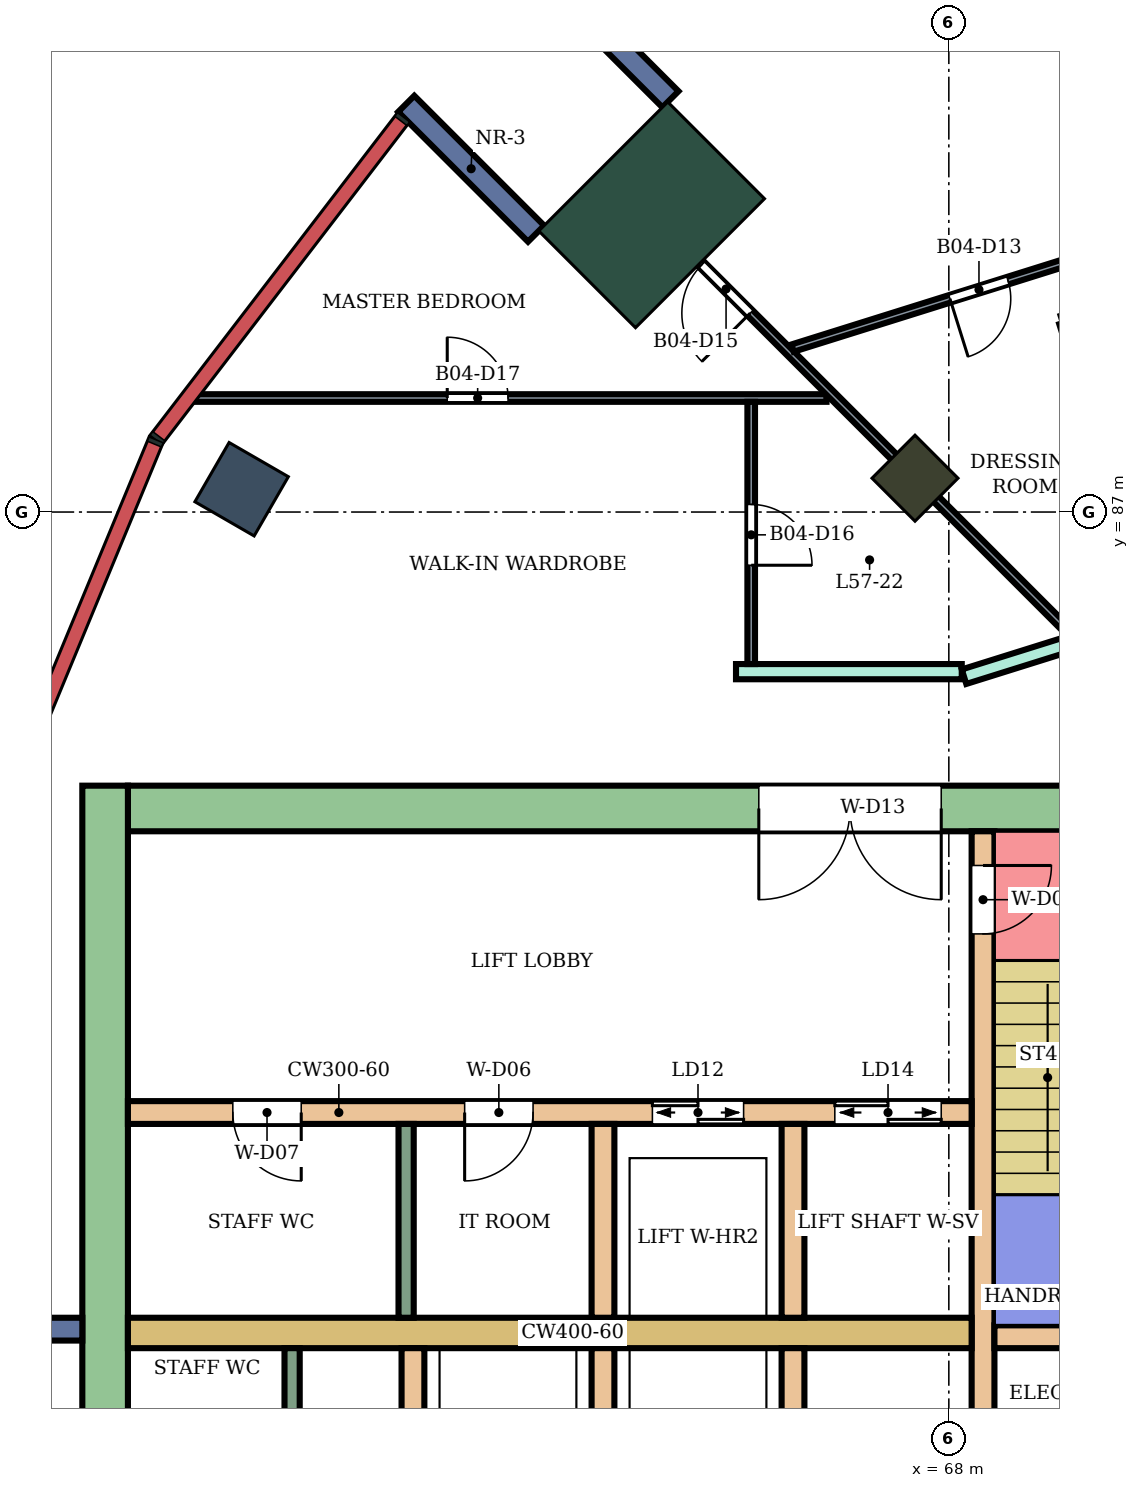
"""IFC4 building model, lengths in metres.
Left out: names, types, materials, properties, quantities, classifications, styles, units other than length and angle.
Written with IfcOpenShell. Run it as: python <this file> out.ifc"""

import sys

from ifc_helpers import new_model, si_unit, direction, frame, frame_2d, origin, origin_2d, place, context, subcontext, project, spatial, rectangle, extrude, element, fill, save


model = new_model("IFC4")
c1 = context("Model", 3, precision=1e-05, world=origin(), true_north=direction((0.0, 1.0)))
c2 = subcontext(c1, "Body", "Model", "MODEL_VIEW")
j1 = project(units=[si_unit("LENGTHUNIT", "METRE"), si_unit("PLANEANGLEUNIT", "RADIAN")], contexts=[c1])
p1 = place(None, origin())
s1 = spatial("IfcSite", under=j1, at=p1, CompositionType="ELEMENT")
p2 = place(p1, origin())
s2 = spatial("IfcBuilding", under=s1, at=p2, CompositionType="ELEMENT")
p3 = place(p2, frame((0.0, 0.0, 249.9)))
s3 = spatial("IfcBuildingStorey", under=s2, at=p3, CompositionType="ELEMENT", Elevation=249.9)
p4 = place(p3, frame((58.696, 87.3, 0.0), z_axis=(0.0, 0.0, 1.0), x_axis=(-0.866025403784, 0.5, 0.0)))
e1 = element("IfcColumn", 1, at=p4, inside=s3, PredefinedType="COLUMN", context=c2, shape_type="SweptSolid", body=[
    extrude(rectangle(XDim=0.9, YDim=0.9, at=origin_2d()), origin(), (0.0, 0.0, 1.0), 4.2),
])
p5 = place(p3, frame((67.555, 87.445, 0.0), z_axis=(0.0, 0.0, 1.0), x_axis=(-0.707106781187, 0.707106781187, 0.0)))
e2 = element("IfcColumn", 2, at=p5, inside=s3, PredefinedType="COLUMN", context=c2, shape_type="SweptSolid", body=[
    extrude(rectangle(XDim=0.8, YDim=0.8, at=origin_2d()), origin(), (0.0, 0.0, 1.0), 4.2),
])
p6 = place(p3, frame((64.09, 90.91, 0.0), z_axis=(0.0, 0.0, 1.0), x_axis=(-0.707106781187, 0.707106781187, 0.0)))
e3 = element("IfcColumn", 3, at=p6, inside=s3, PredefinedType="COLUMN", context=c2, shape_type="SweptSolid", body=[
    extrude(rectangle(XDim=1.8, YDim=2.4, at=origin_2d()), origin(), (0.0, 0.0, 1.0), 4.2),
])
p7 = place(p3, frame((72.1, 83.1, 0.0), z_axis=(0.0, 0.0, 1.0), x_axis=(-1.0, 0.0, 0.0)))
e4 = element("IfcWall", 4, at=p7, inside=s3, PredefinedType="SHEAR", context=c2, shape_type="SweptSolid", body=[
    extrude(rectangle(XDim=14.9, YDim=0.6, at=frame_2d((7.45, 0.0))), origin(), (0.0, 0.0, 1.0), 3.88),
])
p8 = place(p7, frame((4.2, 0.0, 0.0)))
e5 = element("IfcOpeningElement", 5, at=p8, cuts=e4, PredefinedType="OPENING", context=c2, shape_type="SweptSolid", body=[
    extrude(rectangle(XDim=2.4, YDim=2.4, at=frame_2d((1.2, 1.2))), frame((0.0, 0.31, 0.0), z_axis=(0.0, -1.0, 0.0), x_axis=(1.0, 0.0, 0.0)), (0.0, 0.0, 1.0), 0.62),
])
p9 = place(p3, frame((56.9, 83.4, 0.0), z_axis=(0.0, 0.0, 1.0), x_axis=(0.0, -1.0, 0.0)))
e6 = element("IfcWall", 6, at=p9, inside=s3, PredefinedType="SHEAR", context=c2, shape_type="SweptSolid", body=[
    extrude(rectangle(XDim=16.8, YDim=0.6, at=frame_2d((8.4, 0.0))), origin(), (0.0, 0.0, 1.0), 3.88),
])
p10 = place(p3, frame((68.45, 82.8, 0.0), z_axis=(0.0, 0.0, 1.0), x_axis=(0.0, -1.0, 0.0)))
e7 = element("IfcWall", 7, at=p10, inside=s3, PredefinedType="SHEAR", context=c2, shape_type="SweptSolid", body=[
    extrude(rectangle(XDim=7.8, YDim=0.3, at=frame_2d((3.9, 0.0))), origin(), (0.0, 0.0, 1.0), 3.88),
])
p11 = place(p10, frame((0.45, 0.0, 0.0)))
e8 = element("IfcOpeningElement", 8, at=p11, cuts=e7, PredefinedType="OPENING", context=c2, shape_type="SweptSolid", body=[
    extrude(rectangle(XDim=0.9, YDim=2.1, at=frame_2d((0.45, 1.05))), frame((0.0, 0.16, 0.0), z_axis=(0.0, -1.0, 0.0), x_axis=(1.0, 0.0, 0.0)), (0.0, 0.0, 1.0), 0.32),
])
p12 = place(p3, frame((71.65, 76.15, 0.0), z_axis=(0.0, 0.0, 1.0), x_axis=(-1.0, 0.0, 0.0)))
e9 = element("IfcWall", 9, at=p12, inside=s3, PredefinedType="SHEAR", context=c2, shape_type="SweptSolid", body=[
    extrude(rectangle(XDim=3.05, YDim=0.3, at=frame_2d((1.525, 0.0))), origin(), (0.0, 0.0, 1.0), 3.88),
])
p13 = place(p3, frame((68.3, 76.2, 0.0), z_axis=(0.0, 0.0, 1.0), x_axis=(-1.0, 0.0, 0.0)))
e10 = element("IfcWall", 10, at=p13, inside=s3, PredefinedType="SHEAR", context=c2, shape_type="SweptSolid", body=[
    extrude(rectangle(XDim=11.1, YDim=0.4, at=frame_2d((5.55, 0.0))), origin(), (0.0, 0.0, 1.0), 3.88),
])
p14 = place(p3, frame((68.3, 79.1, 0.0), z_axis=(0.0, 0.0, 1.0), x_axis=(-1.0, 0.0, 0.0)))
e11 = element("IfcWall", 11, at=p14, inside=s3, PredefinedType="SHEAR", context=c2, shape_type="SweptSolid", body=[
    extrude(rectangle(XDim=11.1, YDim=0.3, at=frame_2d((5.55, 0.0))), origin(), (0.0, 0.0, 1.0), 3.88),
])
p15 = place(p14, frame((0.4, 0.0, 0.0)))
e12 = element("IfcOpeningElement", 12, at=p15, cuts=e11, PredefinedType="OPENING", context=c2, shape_type="SweptSolid", body=[
    extrude(rectangle(XDim=1.4, YDim=2.1, at=frame_2d((0.7, 1.05))), frame((0.0, 0.16, 0.0), z_axis=(0.0, -1.0, 0.0), x_axis=(1.0, 0.0, 0.0)), (0.0, 0.0, 1.0), 0.32),
])
p16 = place(p14, frame((3.0, 0.0, 0.0)))
e13 = element("IfcOpeningElement", 13, at=p16, cuts=e11, PredefinedType="OPENING", context=c2, shape_type="SweptSolid", body=[
    extrude(rectangle(XDim=1.2, YDim=2.1, at=frame_2d((0.6, 1.05))), frame((0.0, 0.16, 0.0), z_axis=(0.0, -1.0, 0.0), x_axis=(1.0, 0.0, 0.0)), (0.0, 0.0, 1.0), 0.32),
])
p17 = place(p14, frame((5.77, 0.0, 0.0)))
e14 = element("IfcOpeningElement", 14, at=p17, cuts=e11, PredefinedType="OPENING", context=c2, shape_type="SweptSolid", body=[
    extrude(rectangle(XDim=0.9, YDim=2.1, at=frame_2d((0.45, 1.05))), frame((0.0, 0.16, 0.0), z_axis=(0.0, -1.0, 0.0), x_axis=(1.0, 0.0, 0.0)), (0.0, 0.0, 1.0), 0.32),
])
p18 = place(p14, frame((8.82, 0.0, 0.0)))
e15 = element("IfcOpeningElement", 15, at=p18, cuts=e11, PredefinedType="OPENING", context=c2, shape_type="SweptSolid", body=[
    extrude(rectangle(XDim=0.9, YDim=2.1, at=frame_2d((0.45, 1.05))), frame((0.0, 0.16, 0.0), z_axis=(0.0, -1.0, 0.0), x_axis=(1.0, 0.0, 0.0)), (0.0, 0.0, 1.0), 0.32),
])
for number, where, z_axis, x_axis in (
    (16, (65.95, 76.0, 0.0), (0.0, 0.0, 1.0), (0.0, -1.0, 0.0)),
    (17, (63.45, 76.0, 0.0), (0.0, 0.0, 1.0), (0.0, -1.0, 0.0)),
    (18, (60.95, 76.0, 0.0), (0.0, 0.0, 1.0), (0.0, -1.0, 0.0)),
    (19, (65.95, 78.95, 0.0), (0.0, 0.0, 1.0), (0.0, -1.0, 0.0)),
    (20, (63.45, 78.95, 0.0), (0.0, 0.0, 1.0), (0.0, -1.0, 0.0)),
):
    element("IfcWall", number, at=place(p3, frame(where, z_axis=z_axis, x_axis=x_axis)), inside=s3, PredefinedType="SHEAR", context=c2, shape_type="SweptSolid", body=[
        extrude(rectangle(XDim=2.55, YDim=0.3, at=frame_2d((1.275, 0.0))), origin(), (0.0, 0.0, 1.0), 3.88),
    ])
for number, where, z_axis, x_axis in (
    (21, (64.338, 92.43, 0.0), (0.0, 0.0, 1.0), (-0.707, 0.707, 0.0)),
    (22, (62.57, 90.662, 0.0), (0.0, 0.0, 1.0), (-0.707, 0.707, 0.0)),
    (23, (56.6, 76.25, 0.0), (0.0, 0.0, 1.0), (-1.0, 0.0, 0.0)),
):
    element("IfcWall", number, at=place(p3, frame(where, z_axis=z_axis, x_axis=x_axis)), inside=s3, PredefinedType="NOTDEFINED", context=c2, shape_type="SweptSolid", body=[
        extrude(rectangle(XDim=2.416, YDim=0.3, at=frame_2d((1.208, 0.0))), origin(), (0.0, 0.0, 1.0), 4.2),
    ])
p19 = place(p3, frame((65.2, 84.9, 0.0), z_axis=(0.0, 0.0, 1.0), x_axis=(1.0, 0.0, 0.0)))
e24 = element("IfcWall", 24, at=p19, inside=s3, PredefinedType="PARTITIONING", context=c2, shape_type="SweptSolid", body=[
    extrude(rectangle(XDim=2.97, YDim=0.2, at=frame_2d((1.485, 0.0))), origin(), (0.0, 0.0, 1.0), 3.75),
])
p20 = place(p3, frame((68.2, 84.834, 0.0), z_axis=(0.0, 0.0, 1.0), x_axis=(0.954260265251, 0.298977166624, 0.0)))
e25 = element("IfcWall", 25, at=p20, inside=s3, PredefinedType="PARTITIONING", context=c2, shape_type="SweptSolid", body=[
    extrude(rectangle(XDim=5.741, YDim=0.2, at=frame_2d((2.87, 0.0))), origin(), (0.0, 0.0, 1.0), 3.75),
])
p21 = place(p3, frame((58.072, 88.5, 0.0), z_axis=(0.0, 0.0, 1.0), x_axis=(1.0, 0.0, 0.0)))
e26 = element("IfcWall", 26, at=p21, inside=s3, PredefinedType="PARTITIONING", context=c2, shape_type="SweptSolid", body=[
    extrude(rectangle(XDim=8.319, YDim=0.1, at=frame_2d((4.159, 0.0))), origin(), (0.0, 0.0, 1.0), 3.75),
])
p22 = place(p21, frame((3.329, 0.0, 0.0)))
e27 = element("IfcOpeningElement", 27, at=p22, cuts=e26, PredefinedType="OPENING", context=c2, shape_type="SweptSolid", body=[
    extrude(rectangle(XDim=0.8, YDim=2.1, at=frame_2d((0.4, 1.05))), frame((0.0, 0.06, 0.0), z_axis=(0.0, -1.0, 0.0), x_axis=(1.0, 0.0, 0.0)), (0.0, 0.0, 1.0), 0.12),
])
p23 = place(p3, frame((63.597, 91.407, 0.0), z_axis=(0.0, 0.0, 1.0), x_axis=(0.70700623685, -0.707207311228, 0.0)))
e28 = element("IfcWall", 28, at=p23, inside=s3, PredefinedType="PARTITIONING", context=c2, shape_type="SweptSolid", body=[
    extrude(rectangle(XDim=8.499, YDim=0.1, at=frame_2d((4.25, 0.0))), origin(), (0.0, 0.0, 1.0), 3.75),
])
p24 = place(p23, frame((1.632, 0.0, 0.0)))
e29 = element("IfcOpeningElement", 29, at=p24, cuts=e28, PredefinedType="OPENING", context=c2, shape_type="SweptSolid", body=[
    extrude(rectangle(XDim=0.9, YDim=2.1, at=frame_2d((0.45, 1.05))), frame((0.0, 0.06, 0.0), z_axis=(0.0, -1.0, 0.0), x_axis=(1.0, 0.0, 0.0)), (0.0, 0.0, 1.0), 0.12),
])
p25 = place(p3, frame((65.4, 85.0, 0.0), z_axis=(0.0, 0.0, 1.0), x_axis=(0.0, 1.0, 0.0)))
e30 = element("IfcWall", 30, at=p25, inside=s3, PredefinedType="PARTITIONING", context=c2, shape_type="SweptSolid", body=[
    extrude(rectangle(XDim=3.45, YDim=0.1, at=frame_2d((1.725, 0.0))), origin(), (0.0, 0.0, 1.0), 3.75),
])
p26 = place(p25, frame((1.3, 0.0, 0.0)))
e31 = element("IfcOpeningElement", 31, at=p26, cuts=e30, PredefinedType="OPENING", context=c2, shape_type="SweptSolid", body=[
    extrude(rectangle(XDim=0.8, YDim=2.1, at=frame_2d((0.4, 1.05))), frame((0.0, 0.06, 0.0), z_axis=(0.0, -1.0, 0.0), x_axis=(1.0, 0.0, 0.0)), (0.0, 0.0, 1.0), 0.12),
])
p27 = place(p3, frame((65.944, 89.157, 0.0), z_axis=(0.0, 0.0, 1.0), x_axis=(0.954238484697, 0.299046675828, 0.0)))
e32 = element("IfcWall", 32, at=p27, inside=s3, PredefinedType="PARTITIONING", context=c2, shape_type="SweptSolid", body=[
    extrude(rectangle(XDim=5.169, YDim=0.1, at=frame_2d((2.585, 0.0))), origin(), (0.0, 0.0, 1.0), 3.75),
])
p28 = place(p27, frame((2.17, 0.0, 0.0)))
e33 = element("IfcOpeningElement", 33, at=p28, cuts=e32, PredefinedType="OPENING", context=c2, shape_type="SweptSolid", body=[
    extrude(rectangle(XDim=0.8, YDim=2.1, at=frame_2d((0.4, 1.05))), frame((0.0, 0.06, 0.0), z_axis=(0.0, -1.0, 0.0), x_axis=(1.0, 0.0, 0.0)), (0.0, 0.0, 1.0), 0.12),
])
p29 = place(p3, frame((67.111, 97.347, 0.0), z_axis=(0.0, 0.0, 1.0), x_axis=(0.499428303955, -0.866355221147, 0.0)))
e34 = element("IfcWall", 34, at=p29, inside=s3, PredefinedType="PARTITIONING", context=c2, shape_type="SweptSolid", body=[
    extrude(rectangle(XDim=12.456, YDim=0.1, at=frame_2d((6.228, 0.0))), origin(), (0.0, 0.0, 1.0), 3.75),
])
p30 = place(p29, frame((2.538, 0.0, 0.0)))
e35 = element("IfcOpeningElement", 35, at=p30, cuts=e34, PredefinedType="OPENING", context=c2, shape_type="SweptSolid", body=[
    extrude(rectangle(XDim=0.9, YDim=2.1, at=frame_2d((0.45, 1.05))), frame((0.0, 0.06, 0.0), z_axis=(0.0, -1.0, 0.0), x_axis=(1.0, 0.0, 0.0)), (0.0, 0.0, 1.0), 0.12),
])
p31 = place(p29, frame((10.055, 0.0, 0.0)))
e36 = element("IfcOpeningElement", 36, at=p31, cuts=e34, PredefinedType="OPENING", context=c2, shape_type="SweptSolid", body=[
    extrude(rectangle(XDim=0.8, YDim=2.1, at=frame_2d((0.4, 1.05))), frame((0.0, 0.06, 0.0), z_axis=(0.0, -1.0, 0.0), x_axis=(1.0, 0.0, 0.0)), (0.0, 0.0, 1.0), 0.12),
])
for number, where, z_axis, x_axis in (
    (37, (59.36, 76.0, 0.0), (0.0, 0.0, 1.0), (0.0, -1.0, 0.0)),
    (38, (60.86, 78.95, 0.0), (0.0, 0.0, 1.0), (0.0, -1.0, 0.0)),
):
    element("IfcWall", number, at=place(p3, frame(where, z_axis=z_axis, x_axis=x_axis)), inside=s3, PredefinedType="PARTITIONING", context=c2, shape_type="SweptSolid", body=[
        extrude(rectangle(XDim=2.55, YDim=0.2, at=frame_2d((1.275, 0.0))), origin(), (0.0, 0.0, 1.0), 3.88),
    ])
p32 = place(p28, frame((0.8, 0.0, 0.0), z_axis=(0.0, 0.0, 1.0), x_axis=(-1.0, 0.0, 0.0)))
e39 = element("IfcDoor", 39, at=p32, inside=s3, OperationType="SINGLE_SWING_RIGHT", PredefinedType="DOOR", context=c2, shape_type="SweptSolid", body=[
    extrude(rectangle(XDim=0.8, YDim=2.1, at=frame_2d((0.4, 1.05))), frame((0.0, 0.025, 0.0), z_axis=(0.0, -1.0, 0.0), x_axis=(1.0, 0.0, 0.0)), (0.0, 0.0, 1.0), 0.05),
])
fill(e33, e39)
p33 = place(p24, frame((0.9, 0.0, 0.0), z_axis=(0.0, 0.0, 1.0), x_axis=(-1.0, 0.0, 0.0)))
e40 = element("IfcDoor", 40, at=p33, inside=s3, OperationType="SINGLE_SWING_LEFT", PredefinedType="DOOR", context=c2, shape_type="SweptSolid", body=[
    extrude(rectangle(XDim=0.9, YDim=2.1, at=frame_2d((0.45, 1.05))), frame((0.0, 0.025, 0.0), z_axis=(0.0, -1.0, 0.0), x_axis=(1.0, 0.0, 0.0)), (0.0, 0.0, 1.0), 0.05),
])
fill(e29, e40)
p34 = place(p26, frame((0.8, 0.0, 0.0), z_axis=(0.0, 0.0, 1.0), x_axis=(-1.0, 0.0, 0.0)))
e41 = element("IfcDoor", 41, at=p34, inside=s3, OperationType="SINGLE_SWING_RIGHT", PredefinedType="DOOR", context=c2, shape_type="SweptSolid", body=[
    extrude(rectangle(XDim=0.8, YDim=2.1, at=frame_2d((0.4, 1.05))), frame((0.0, 0.025, 0.0), z_axis=(0.0, -1.0, 0.0), x_axis=(1.0, 0.0, 0.0)), (0.0, 0.0, 1.0), 0.05),
])
fill(e31, e41)
p35 = place(p22, origin())
e42 = element("IfcDoor", 42, at=p35, inside=s3, OperationType="SINGLE_SWING_LEFT", PredefinedType="DOOR", context=c2, shape_type="SweptSolid", body=[
    extrude(rectangle(XDim=0.8, YDim=2.1, at=frame_2d((0.4, 1.05))), frame((0.0, 0.025, 0.0), z_axis=(0.0, -1.0, 0.0), x_axis=(1.0, 0.0, 0.0)), (0.0, 0.0, 1.0), 0.05),
])
fill(e27, e42)
p36 = place(p11, origin())
e43 = element("IfcDoor", 43, at=p36, inside=s3, OperationType="SINGLE_SWING_LEFT", PredefinedType="DOOR", context=c2, shape_type="SweptSolid", body=[
    extrude(rectangle(XDim=0.9, YDim=2.1, at=frame_2d((0.45, 1.05))), frame((0.0, 0.025, 0.0), z_axis=(0.0, -1.0, 0.0), x_axis=(1.0, 0.0, 0.0)), (0.0, 0.0, 1.0), 0.05),
])
fill(e8, e43)
p37 = place(p15, origin())
e44 = element("IfcDoor", 44, at=p37, inside=s3, OperationType="DOUBLE_DOOR_SLIDING", PredefinedType="DOOR", context=c2, shape_type="SweptSolid", body=[
    extrude(rectangle(XDim=1.4, YDim=2.1, at=frame_2d((0.7, 1.05))), frame((0.0, 0.025, 0.0), z_axis=(0.0, -1.0, 0.0), x_axis=(1.0, 0.0, 0.0)), (0.0, 0.0, 1.0), 0.05),
])
fill(e12, e44)
p38 = place(p16, origin())
e45 = element("IfcDoor", 45, at=p38, inside=s3, OperationType="DOUBLE_DOOR_SLIDING", PredefinedType="DOOR", context=c2, shape_type="SweptSolid", body=[
    extrude(rectangle(XDim=1.2, YDim=2.1, at=frame_2d((0.6, 1.05))), frame((0.0, 0.025, 0.0), z_axis=(0.0, -1.0, 0.0), x_axis=(1.0, 0.0, 0.0)), (0.0, 0.0, 1.0), 0.05),
])
fill(e13, e45)
p39 = place(p17, origin())
e46 = element("IfcDoor", 46, at=p39, inside=s3, OperationType="SINGLE_SWING_RIGHT", PredefinedType="DOOR", context=c2, shape_type="SweptSolid", body=[
    extrude(rectangle(XDim=0.9, YDim=2.1, at=frame_2d((0.45, 1.05))), frame((0.0, 0.025, 0.0), z_axis=(0.0, -1.0, 0.0), x_axis=(1.0, 0.0, 0.0)), (0.0, 0.0, 1.0), 0.05),
])
fill(e14, e46)
p40 = place(p18, origin())
e47 = element("IfcDoor", 47, at=p40, inside=s3, OperationType="SINGLE_SWING_LEFT", PredefinedType="DOOR", context=c2, shape_type="SweptSolid", body=[
    extrude(rectangle(XDim=0.9, YDim=2.1, at=frame_2d((0.45, 1.05))), frame((0.0, 0.025, 0.0), z_axis=(0.0, -1.0, 0.0), x_axis=(1.0, 0.0, 0.0)), (0.0, 0.0, 1.0), 0.05),
])
fill(e15, e47)
p41 = place(p8, origin())
e48 = element("IfcDoor", 48, at=p41, inside=s3, OperationType="DOUBLE_DOOR_SINGLE_SWING", PredefinedType="DOOR", context=c2, shape_type="SweptSolid", body=[
    extrude(rectangle(XDim=2.4, YDim=2.4, at=frame_2d((1.2, 1.2))), frame((0.0, 0.025, 0.0), z_axis=(0.0, -1.0, 0.0), x_axis=(1.0, 0.0, 0.0)), (0.0, 0.0, 1.0), 0.05),
])
fill(e5, e48)
save(model, sys.argv[1])
